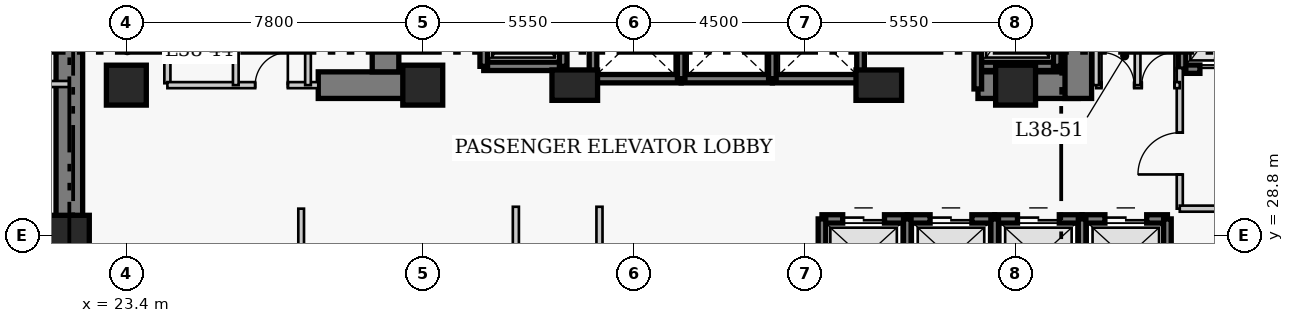
"""IFC4 building model, lengths in metres.
Left out: names, types, materials, properties, quantities, classifications, styles, units other than length and angle.
Written with IfcOpenShell. Run it as: python <this file> out.ifc"""

import sys

from ifc_helpers import new_model, si_unit, direction, frame, frame_2d, origin, origin_2d, place, context, subcontext, project, spatial, rectangle, extrude, element, fill, save


model = new_model("IFC4")
c1 = context("Model", 3, precision=1e-05, world=origin(), true_north=direction((0.0, 1.0)))
c2 = subcontext(c1, "Body", "Model", "MODEL_VIEW")
j1 = project(units=[si_unit("LENGTHUNIT", "METRE"), si_unit("PLANEANGLEUNIT", "RADIAN")], contexts=[c1])
p1 = place(None, origin())
s1 = spatial("IfcSite", under=j1, at=p1, CompositionType="ELEMENT")
p2 = place(p1, origin())
s2 = spatial("IfcBuilding", under=s1, at=p2, CompositionType="ELEMENT")
p3 = place(p2, frame((0.0, 0.0, 153.6)))
s3 = spatial("IfcBuildingStorey", under=s2, at=p3, CompositionType="ELEMENT", Elevation=153.6)
p4 = place(p3, frame((21.9, 27.05, 0.0), z_axis=(0.0, 0.0, 1.0), x_axis=(0.0, 1.0, 0.0)))
e1 = element("IfcWall", 1, at=p4, inside=s3, PredefinedType="SHEAR", context=c2, shape_type="SweptSolid", body=[
    extrude(rectangle(XDim=13.62, YDim=0.7, at=frame_2d((6.81, 0.0))), origin(), (0.0, 0.0, 1.0), 3.8),
])
p5 = place(p3, frame((28.45, 32.75, 0.0), z_axis=(0.0, 0.0, 1.0), x_axis=(1.0, 0.0, 0.0)))
e2 = element("IfcWall", 2, at=p5, inside=s3, PredefinedType="SHEAR", context=c2, shape_type="SweptSolid", body=[
    extrude(rectangle(XDim=2.4, YDim=0.7, at=frame_2d((1.2, 0.0))), origin(), (0.0, 0.0, 1.0), 3.8),
])
p6 = place(p3, frame((45.81, 32.75, 0.0), z_axis=(0.0, 0.0, 1.0), x_axis=(1.0, 0.0, 0.0)))
e3 = element("IfcWall", 3, at=p6, inside=s3, PredefinedType="SHEAR", context=c2, shape_type="SweptSolid", body=[
    extrude(rectangle(XDim=2.64, YDim=0.7, at=frame_2d((1.32, 0.0))), origin(), (0.0, 0.0, 1.0), 3.8),
])
p7 = place(p3, frame((30.22, 33.1, 0.0), z_axis=(0.0, 0.0, 1.0), x_axis=(0.0, 1.0, 0.0)))
e4 = element("IfcWall", 4, at=p7, inside=s3, PredefinedType="SHEAR", context=c2, shape_type="SweptSolid", body=[
    extrude(rectangle(XDim=7.22, YDim=0.7, at=frame_2d((3.61, 0.0))), origin(), (0.0, 0.0, 1.0), 3.8),
])
p8 = place(p3, frame((48.45, 32.4, 0.0), z_axis=(0.0, 0.0, 1.0), x_axis=(0.0, 1.0, 0.0)))
e5 = element("IfcWall", 5, at=p8, inside=s3, PredefinedType="SHEAR", context=c2, shape_type="SweptSolid", body=[
    extrude(rectangle(XDim=7.92, YDim=0.7, at=frame_2d((3.96, 0.0))), origin(), (0.0, 0.0, 1.0), 3.8),
])
p9 = place(p8, frame((5.8, 0.0, 0.0)))
e6 = element("IfcOpeningElement", 6, at=p9, cuts=e5, PredefinedType="OPENING", context=c2, shape_type="SweptSolid", body=[
    extrude(rectangle(XDim=1.1, YDim=2.15, at=frame_2d((0.55, 1.075))), frame((0.0, 0.36, 0.0), z_axis=(0.0, -1.0, 0.0), x_axis=(1.0, 0.0, 0.0)), (0.0, 0.0, 1.0), 0.72),
])
for number, where, z_axis, x_axis in (
    (7, (21.9, 28.8, 0.0), (0.0, 0.0, 1.0), (1.0, 0.0, 0.0)),
    (8, (23.4, 32.75, 0.0), (0.0, 0.0, 1.0), (1.0, 0.0, 0.0)),
    (9, (31.2, 32.75, 0.0), (0.0, 0.0, 1.0), (1.0, 0.0, 0.0)),
):
    element("IfcColumn", number, at=place(p3, frame(where, z_axis=z_axis, x_axis=x_axis)), inside=s3, PredefinedType="COLUMN", context=c2, shape_type="SweptSolid", body=[
        extrude(rectangle(XDim=1.05, YDim=1.05, at=origin_2d()), origin(), (0.0, 0.0, 1.0), 3.8),
    ])
for number, where, z_axis, x_axis in (
    (10, (35.2, 32.75, 0.0), (0.0, 0.0, 1.0), (1.0, 0.0, 0.0)),
    (11, (43.2, 32.75, 0.0), (0.0, 0.0, 1.0), (1.0, 0.0, 0.0)),
):
    element("IfcColumn", number, at=place(p3, frame(where, z_axis=z_axis, x_axis=x_axis)), inside=s3, PredefinedType="COLUMN", context=c2, shape_type="SweptSolid", body=[
        extrude(rectangle(XDim=1.2, YDim=0.8, at=origin_2d()), origin(), (0.0, 0.0, 1.0), 3.8),
    ])
p10 = place(p3, frame((46.8, 32.75, 0.0), z_axis=(0.0, 0.0, 1.0), x_axis=(1.0, 0.0, 0.0)))
e12 = element("IfcColumn", 12, at=p10, inside=s3, PredefinedType="COLUMN", context=c2, shape_type="SweptSolid", body=[
    extrude(rectangle(XDim=1.05, YDim=1.05, at=origin_2d()), origin(), (0.0, 0.0, 1.0), 3.8),
])
p11 = place(p3, frame((41.705, 29.23, 0.0), z_axis=(0.0, 0.0, 1.0), x_axis=(1.0, 0.0, 0.0)))
e13 = element("IfcWall", 13, at=p11, inside=s3, PredefinedType="SHEAR", context=c2, shape_type="SweptSolid", body=[
    extrude(rectangle(XDim=2.245, YDim=0.22, at=frame_2d((1.123, 0.0))), origin(), (0.0, 0.0, 1.0), 3.8),
])
p12 = place(p11, frame((0.545, 0.0, 0.0)))
e14 = element("IfcOpeningElement", 14, at=p12, cuts=e13, PredefinedType="OPENING", context=c2, shape_type="SweptSolid", body=[
    extrude(rectangle(XDim=1.1, YDim=2.15, at=frame_2d((0.55, 1.075))), frame((0.0, 0.12, 0.0), z_axis=(0.0, -1.0, 0.0), x_axis=(1.0, 0.0, 0.0)), (0.0, 0.0, 1.0), 0.24),
])
p13 = place(p3, frame((41.705, 27.17, 0.0), z_axis=(0.0, 0.0, 1.0), x_axis=(0.0, 1.0, 0.0)))
e15 = element("IfcWall", 15, at=p13, inside=s3, PredefinedType="SHEAR", context=c2, shape_type="SweptSolid", body=[
    extrude(rectangle(XDim=2.06, YDim=0.2, at=frame_2d((1.03, 0.0))), origin(), (0.0, 0.0, 1.0), 3.8),
])
p14 = place(p3, frame((43.95, 29.23, 0.0), z_axis=(0.0, 0.0, 1.0), x_axis=(1.0, 0.0, 0.0)))
e16 = element("IfcWall", 16, at=p14, inside=s3, PredefinedType="SHEAR", context=c2, shape_type="SweptSolid", body=[
    extrude(rectangle(XDim=2.3, YDim=0.22, at=frame_2d((1.15, 0.0))), origin(), (0.0, 0.0, 1.0), 3.8),
])
p15 = place(p14, frame((0.6, 0.0, 0.0)))
e17 = element("IfcOpeningElement", 17, at=p15, cuts=e16, PredefinedType="OPENING", context=c2, shape_type="SweptSolid", body=[
    extrude(rectangle(XDim=1.1, YDim=2.15, at=frame_2d((0.55, 1.075))), frame((0.0, 0.12, 0.0), z_axis=(0.0, -1.0, 0.0), x_axis=(1.0, 0.0, 0.0)), (0.0, 0.0, 1.0), 0.24),
])
p16 = place(p3, frame((43.95, 27.17, 0.0), z_axis=(0.0, 0.0, 1.0), x_axis=(0.0, 1.0, 0.0)))
e18 = element("IfcWall", 18, at=p16, inside=s3, PredefinedType="SHEAR", context=c2, shape_type="SweptSolid", body=[
    extrude(rectangle(XDim=2.06, YDim=0.2, at=frame_2d((1.03, 0.0))), origin(), (0.0, 0.0, 1.0), 3.8),
])
p17 = place(p3, frame((46.25, 29.23, 0.0), z_axis=(0.0, 0.0, 1.0), x_axis=(1.0, 0.0, 0.0)))
e19 = element("IfcWall", 19, at=p17, inside=s3, PredefinedType="SHEAR", context=c2, shape_type="SweptSolid", body=[
    extrude(rectangle(XDim=2.3, YDim=0.22, at=frame_2d((1.15, 0.0))), origin(), (0.0, 0.0, 1.0), 3.8),
])
p18 = place(p17, frame((0.6, 0.0, 0.0)))
e20 = element("IfcOpeningElement", 20, at=p18, cuts=e19, PredefinedType="OPENING", context=c2, shape_type="SweptSolid", body=[
    extrude(rectangle(XDim=1.1, YDim=2.15, at=frame_2d((0.55, 1.075))), frame((0.0, 0.12, 0.0), z_axis=(0.0, -1.0, 0.0), x_axis=(1.0, 0.0, 0.0)), (0.0, 0.0, 1.0), 0.24),
])
p19 = place(p3, frame((46.25, 27.17, 0.0), z_axis=(0.0, 0.0, 1.0), x_axis=(0.0, 1.0, 0.0)))
e21 = element("IfcWall", 21, at=p19, inside=s3, PredefinedType="SHEAR", context=c2, shape_type="SweptSolid", body=[
    extrude(rectangle(XDim=2.06, YDim=0.2, at=frame_2d((1.03, 0.0))), origin(), (0.0, 0.0, 1.0), 3.8),
])
p20 = place(p3, frame((48.55, 29.23, 0.0), z_axis=(0.0, 0.0, 1.0), x_axis=(1.0, 0.0, 0.0)))
e22 = element("IfcWall", 22, at=p20, inside=s3, PredefinedType="SHEAR", context=c2, shape_type="SweptSolid", body=[
    extrude(rectangle(XDim=2.245, YDim=0.22, at=frame_2d((1.123, 0.0))), origin(), (0.0, 0.0, 1.0), 3.8),
])
p21 = place(p20, frame((0.6, 0.0, 0.0)))
e23 = element("IfcOpeningElement", 23, at=p21, cuts=e22, PredefinedType="OPENING", context=c2, shape_type="SweptSolid", body=[
    extrude(rectangle(XDim=1.1, YDim=2.15, at=frame_2d((0.55, 1.075))), frame((0.0, 0.12, 0.0), z_axis=(0.0, -1.0, 0.0), x_axis=(1.0, 0.0, 0.0)), (0.0, 0.0, 1.0), 0.24),
])
for number, where, z_axis, x_axis in (
    (24, (48.55, 27.17, 0.0), (0.0, 0.0, 1.0), (0.0, 1.0, 0.0)),
    (25, (50.795, 27.17, 0.0), (0.0, 0.0, 1.0), (0.0, 1.0, 0.0)),
):
    element("IfcWall", number, at=place(p3, frame(where, z_axis=z_axis, x_axis=x_axis)), inside=s3, PredefinedType="SHEAR", context=c2, shape_type="SweptSolid", body=[
        extrude(rectangle(XDim=2.06, YDim=0.2, at=frame_2d((1.03, 0.0))), origin(), (0.0, 0.0, 1.0), 3.8),
    ])
p22 = place(p3, frame((35.68, 32.92, 0.0), z_axis=(0.0, 0.0, 1.0), x_axis=(1.0, 0.0, 0.0)))
e26 = element("IfcWall", 26, at=p22, inside=s3, PredefinedType="SHEAR", context=c2, shape_type="SweptSolid", body=[
    extrude(rectangle(XDim=2.32, YDim=0.22, at=frame_2d((1.16, 0.0))), origin(), (0.0, 0.0, 1.0), 3.8),
])
p23 = place(p3, frame((35.68, 32.92, 0.0), z_axis=(0.0, 0.0, 1.0), x_axis=(0.0, 1.0, 0.0)))
e27 = element("IfcWall", 27, at=p23, inside=s3, PredefinedType="SHEAR", context=c2, shape_type="SweptSolid", body=[
    extrude(rectangle(XDim=2.16, YDim=0.2, at=frame_2d((1.08, 0.0))), origin(), (0.0, 0.0, 1.0), 3.8),
])
p24 = place(p3, frame((38.0, 32.92, 0.0), z_axis=(0.0, 0.0, 1.0), x_axis=(1.0, 0.0, 0.0)))
e28 = element("IfcWall", 28, at=p24, inside=s3, PredefinedType="SHEAR", context=c2, shape_type="SweptSolid", body=[
    extrude(rectangle(XDim=2.4, YDim=0.22, at=frame_2d((1.2, 0.0))), origin(), (0.0, 0.0, 1.0), 3.8),
])
p25 = place(p3, frame((38.0, 32.92, 0.0), z_axis=(0.0, 0.0, 1.0), x_axis=(0.0, 1.0, 0.0)))
e29 = element("IfcWall", 29, at=p25, inside=s3, PredefinedType="SHEAR", context=c2, shape_type="SweptSolid", body=[
    extrude(rectangle(XDim=2.16, YDim=0.2, at=frame_2d((1.08, 0.0))), origin(), (0.0, 0.0, 1.0), 3.8),
])
p26 = place(p3, frame((40.4, 32.92, 0.0), z_axis=(0.0, 0.0, 1.0), x_axis=(1.0, 0.0, 0.0)))
e30 = element("IfcWall", 30, at=p26, inside=s3, PredefinedType="SHEAR", context=c2, shape_type="SweptSolid", body=[
    extrude(rectangle(XDim=2.32, YDim=0.22, at=frame_2d((1.16, 0.0))), origin(), (0.0, 0.0, 1.0), 3.8),
])
for number, where, z_axis, x_axis in (
    (31, (40.4, 32.92, 0.0), (0.0, 0.0, 1.0), (0.0, 1.0, 0.0)),
    (32, (42.72, 32.92, 0.0), (0.0, 0.0, 1.0), (0.0, 1.0, 0.0)),
):
    element("IfcWall", number, at=place(p3, frame(where, z_axis=z_axis, x_axis=x_axis)), inside=s3, PredefinedType="SHEAR", context=c2, shape_type="SweptSolid", body=[
        extrude(rectangle(XDim=2.16, YDim=0.2, at=frame_2d((1.08, 0.0))), origin(), (0.0, 0.0, 1.0), 3.8),
    ])
p27 = place(p3, frame((51.18, 33.17, 0.0), z_axis=(0.0, 0.0, 1.0), x_axis=(1.0, 0.0, 0.0)))
e33 = element("IfcWall", 33, at=p27, inside=s3, PredefinedType="SHEAR", context=c2, shape_type="SweptSolid", body=[
    extrude(rectangle(XDim=2.42, YDim=0.22, at=frame_2d((1.21, 0.0))), origin(), (0.0, 0.0, 1.0), 3.8),
])
p28 = place(p27, frame((0.47, 0.0, 0.0)))
e34 = element("IfcOpeningElement", 34, at=p28, cuts=e33, PredefinedType="OPENING", context=c2, shape_type="SweptSolid", body=[
    extrude(rectangle(XDim=1.3, YDim=2.15, at=frame_2d((0.65, 1.075))), frame((0.0, 0.12, 0.0), z_axis=(0.0, -1.0, 0.0), x_axis=(1.0, 0.0, 0.0)), (0.0, 0.0, 1.0), 0.24),
])
p29 = place(p3, frame((51.18, 33.17, 0.0), z_axis=(0.0, 0.0, 1.0), x_axis=(0.0, 1.0, 0.0)))
e35 = element("IfcWall", 35, at=p29, inside=s3, PredefinedType="SHEAR", context=c2, shape_type="SweptSolid", body=[
    extrude(rectangle(XDim=2.86, YDim=0.2, at=frame_2d((1.43, 0.0))), origin(), (0.0, 0.0, 1.0), 3.8),
])
p30 = place(p3, frame((32.805, 33.245, 0.0), z_axis=(0.0, 0.0, 1.0), x_axis=(1.0, 0.0, 0.0)))
e36 = element("IfcWall", 36, at=p30, inside=s3, PredefinedType="SHEAR", context=c2, shape_type="SweptSolid", body=[
    extrude(rectangle(XDim=2.09, YDim=0.22, at=frame_2d((1.045, 0.0))), origin(), (0.0, 0.0, 1.0), 3.8),
])
for number, where, z_axis, x_axis in (
    (37, (32.805, 33.245, 0.0), (0.0, 0.0, 1.0), (0.0, 1.0, 0.0)),
    (38, (34.895, 33.245, 0.0), (0.0, 0.0, 1.0), (0.0, 1.0, 0.0)),
):
    element("IfcWall", number, at=place(p3, frame(where, z_axis=z_axis, x_axis=x_axis)), inside=s3, PredefinedType="SHEAR", context=c2, shape_type="SweptSolid", body=[
        extrude(rectangle(XDim=2.91, YDim=0.2, at=frame_2d((1.455, 0.0))), origin(), (0.0, 0.0, 1.0), 3.8),
    ])
p31 = place(p3, frame((45.805, 33.245, 0.0), z_axis=(0.0, 0.0, 1.0), x_axis=(1.0, 0.0, 0.0)))
e39 = element("IfcWall", 39, at=p31, inside=s3, PredefinedType="SHEAR", context=c2, shape_type="SweptSolid", body=[
    extrude(rectangle(XDim=2.09, YDim=0.22, at=frame_2d((1.045, 0.0))), origin(), (0.0, 0.0, 1.0), 3.8),
])
p32 = place(p3, frame((45.805, 32.65, 0.0), z_axis=(0.0, 0.0, 1.0), x_axis=(0.0, 1.0, 0.0)))
e40 = element("IfcWall", 40, at=p32, inside=s3, PredefinedType="SHEAR", context=c2, shape_type="SweptSolid", body=[
    extrude(rectangle(XDim=3.505, YDim=0.2, at=frame_2d((1.752, 0.0))), origin(), (0.0, 0.0, 1.0), 3.8),
])
p33 = place(p3, frame((47.895, 33.245, 0.0), z_axis=(0.0, 0.0, 1.0), x_axis=(0.0, 1.0, 0.0)))
e41 = element("IfcWall", 41, at=p33, inside=s3, PredefinedType="SHEAR", context=c2, shape_type="SweptSolid", body=[
    extrude(rectangle(XDim=2.91, YDim=0.2, at=frame_2d((1.455, 0.0))), origin(), (0.0, 0.0, 1.0), 3.8),
])
p34 = place(p3, frame((24.48, 32.8, 0.0), z_axis=(0.0, 0.0, 1.0), x_axis=(0.0, 1.0, 0.0)))
e42 = element("IfcWall", 42, at=p34, inside=s3, PredefinedType="PARTITIONING", context=c2, shape_type="SweptSolid", body=[
    extrude(rectangle(XDim=3.57, YDim=0.16, at=frame_2d((1.785, 0.0))), origin(), (0.0, 0.0, 1.0), 3.55),
])
p35 = place(p34, frame((1.604, 0.0, 0.0)))
e43 = element("IfcOpeningElement", 43, at=p35, cuts=e42, PredefinedType="OPENING", context=c2, shape_type="SweptSolid", body=[
    extrude(rectangle(XDim=0.9, YDim=2.1, at=frame_2d((0.45, 1.05))), frame((0.0, 0.09, 0.0), z_axis=(0.0, -1.0, 0.0), x_axis=(1.0, 0.0, 0.0)), (0.0, 0.0, 1.0), 0.18),
])
p36 = place(p3, frame((51.12, 29.5, 0.0), z_axis=(0.0, 0.0, 1.0), x_axis=(0.0, 1.0, 0.0)))
e44 = element("IfcWall", 44, at=p36, inside=s3, PredefinedType="PARTITIONING", context=c2, shape_type="SweptSolid", body=[
    extrude(rectangle(XDim=3.7, YDim=0.16, at=frame_2d((1.85, 0.0))), origin(), (0.0, 0.0, 1.0), 3.55),
])
p37 = place(p36, frame((0.9, 0.0, 0.0)))
e45 = element("IfcOpeningElement", 45, at=p37, cuts=e44, PredefinedType="OPENING", context=c2, shape_type="SweptSolid", body=[
    extrude(rectangle(XDim=1.1, YDim=2.15, at=frame_2d((0.55, 1.075))), frame((0.0, 0.09, 0.0), z_axis=(0.0, -1.0, 0.0), x_axis=(1.0, 0.0, 0.0)), (0.0, 0.0, 1.0), 0.18),
])
p38 = place(p3, frame((51.12, 29.5, 0.0), z_axis=(0.0, 0.0, 1.0), x_axis=(1.0, 0.0, 0.0)))
e46 = element("IfcWall", 46, at=p38, inside=s3, PredefinedType="PARTITIONING", context=c2, shape_type="SweptSolid", body=[
    extrude(rectangle(XDim=5.63, YDim=0.16, at=frame_2d((2.815, 0.0))), origin(), (0.0, 0.0, 1.0), 3.55),
])
p39 = place(p3, frame((24.48, 32.75, 0.0), z_axis=(0.0, 0.0, 1.0), x_axis=(1.0, 0.0, 0.0)))
e47 = element("IfcWall", 47, at=p39, inside=s3, PredefinedType="PARTITIONING", context=c2, shape_type="SweptSolid", body=[
    extrude(rectangle(XDim=3.97, YDim=0.16, at=frame_2d((1.985, 0.0))), origin(), (0.0, 0.0, 1.0), 3.55),
])
p40 = place(p39, frame((2.31, 0.0, 0.0)))
e48 = element("IfcOpeningElement", 48, at=p40, cuts=e47, PredefinedType="OPENING", context=c2, shape_type="SweptSolid", body=[
    extrude(rectangle(XDim=0.86, YDim=2.05, at=frame_2d((0.43, 1.025))), frame((0.0, 0.09, 0.0), z_axis=(0.0, -1.0, 0.0), x_axis=(1.0, 0.0, 0.0)), (0.0, 0.0, 1.0), 0.18),
])
p41 = place(p3, frame((48.92, 32.75, 0.0), z_axis=(0.0, 0.0, 1.0), x_axis=(1.0, 0.0, 0.0)))
e49 = element("IfcWall", 49, at=p41, inside=s3, PredefinedType="PARTITIONING", context=c2, shape_type="SweptSolid", body=[
    extrude(rectangle(XDim=2.2, YDim=0.16, at=frame_2d((1.1, 0.0))), origin(), (0.0, 0.0, 1.0), 3.55),
])
p42 = place(p41, frame((0.14, 0.0, 0.0)))
e50 = element("IfcOpeningElement", 50, at=p42, cuts=e49, PredefinedType="OPENING", context=c2, shape_type="SweptSolid", body=[
    extrude(rectangle(XDim=0.86, YDim=2.05, at=frame_2d((0.43, 1.025))), frame((0.0, 0.09, 0.0), z_axis=(0.0, -1.0, 0.0), x_axis=(1.0, 0.0, 0.0)), (0.0, 0.0, 1.0), 0.18),
])
p43 = place(p41, frame((1.2, 0.0, 0.0)))
e51 = element("IfcOpeningElement", 51, at=p43, cuts=e49, PredefinedType="OPENING", context=c2, shape_type="SweptSolid", body=[
    extrude(rectangle(XDim=0.86, YDim=2.05, at=frame_2d((0.43, 1.025))), frame((0.0, 0.09, 0.0), z_axis=(0.0, -1.0, 0.0), x_axis=(1.0, 0.0, 0.0)), (0.0, 0.0, 1.0), 0.18),
])
for number, where, z_axis, x_axis in (
    (52, (48.92, 32.75, 0.0), (0.0, 0.0, 1.0), (0.0, 1.0, 0.0)),
    (53, (26.28, 32.75, 0.0), (0.0, 0.0, 1.0), (0.0, 1.0, 0.0)),
    (54, (28.18, 32.75, 0.0), (0.0, 0.0, 1.0), (0.0, 1.0, 0.0)),
    (55, (50.01, 32.75, 0.0), (0.0, 0.0, 1.0), (0.0, 1.0, 0.0)),
):
    element("IfcWall", number, at=place(p3, frame(where, z_axis=z_axis, x_axis=x_axis)), inside=s3, PredefinedType="PARTITIONING", context=c2, shape_type="SweptSolid", body=[
        extrude(rectangle(XDim=3.62, YDim=0.15, at=frame_2d((1.81, 0.0))), origin(), (0.0, 0.0, 1.0), 3.55),
    ])
for number, where, z_axis, x_axis in (
    (56, (33.65, 16.51, 0.0), (0.0, 0.0, 1.0), (0.0, 1.0, 0.0)),
    (57, (35.85, 16.51, 0.0), (0.0, 0.0, 1.0), (0.0, 1.0, 0.0)),
):
    element("IfcWall", number, at=place(p3, frame(where, z_axis=z_axis, x_axis=x_axis)), inside=s3, PredefinedType="PARTITIONING", context=c2, shape_type="SweptSolid", body=[
        extrude(rectangle(XDim=13.04, YDim=0.16, at=frame_2d((6.52, 0.0))), origin(), (0.0, 0.0, 1.0), 3.55),
    ])
p44 = place(p3, frame((19.41, 32.78, 0.0), z_axis=(0.0, 0.0, 1.0), x_axis=(1.0, 0.0, 0.0)))
e58 = element("IfcWall", 58, at=p44, inside=s3, PredefinedType="PARTITIONING", context=c2, shape_type="SweptSolid", body=[
    extrude(rectangle(XDim=2.49, YDim=0.16, at=frame_2d((1.245, 0.0))), origin(), (0.0, 0.0, 1.0), 3.55),
])
p45 = place(p3, frame((28.0, 16.51, 0.0), z_axis=(0.0, 0.0, 1.0), x_axis=(0.0, 1.0, 0.0)))
e59 = element("IfcWall", 59, at=p45, inside=s3, PredefinedType="PARTITIONING", context=c2, shape_type="SweptSolid", body=[
    extrude(rectangle(XDim=12.99, YDim=0.15, at=frame_2d((6.495, 0.0))), origin(), (0.0, 0.0, 1.0), 3.55),
])
p46 = place(p12, origin())
e60 = element("IfcDoor", 60, at=p46, inside=s3, OperationType="DOUBLE_DOOR_SLIDING", PredefinedType="DOOR", context=c2, shape_type="SweptSolid", body=[
    extrude(rectangle(XDim=1.1, YDim=2.15, at=frame_2d((0.55, 1.075))), frame((0.0, 0.025, 0.0), z_axis=(0.0, -1.0, 0.0), x_axis=(1.0, 0.0, 0.0)), (0.0, 0.0, 1.0), 0.05),
])
fill(e14, e60)
p47 = place(p15, origin())
e61 = element("IfcDoor", 61, at=p47, inside=s3, OperationType="DOUBLE_DOOR_SLIDING", PredefinedType="DOOR", context=c2, shape_type="SweptSolid", body=[
    extrude(rectangle(XDim=1.1, YDim=2.15, at=frame_2d((0.55, 1.075))), frame((0.0, 0.025, 0.0), z_axis=(0.0, -1.0, 0.0), x_axis=(1.0, 0.0, 0.0)), (0.0, 0.0, 1.0), 0.05),
])
fill(e17, e61)
p48 = place(p18, origin())
e62 = element("IfcDoor", 62, at=p48, inside=s3, OperationType="DOUBLE_DOOR_SLIDING", PredefinedType="DOOR", context=c2, shape_type="SweptSolid", body=[
    extrude(rectangle(XDim=1.1, YDim=2.15, at=frame_2d((0.55, 1.075))), frame((0.0, 0.025, 0.0), z_axis=(0.0, -1.0, 0.0), x_axis=(1.0, 0.0, 0.0)), (0.0, 0.0, 1.0), 0.05),
])
fill(e20, e62)
p49 = place(p21, origin())
e63 = element("IfcDoor", 63, at=p49, inside=s3, OperationType="DOUBLE_DOOR_SLIDING", PredefinedType="DOOR", context=c2, shape_type="SweptSolid", body=[
    extrude(rectangle(XDim=1.1, YDim=2.15, at=frame_2d((0.55, 1.075))), frame((0.0, 0.025, 0.0), z_axis=(0.0, -1.0, 0.0), x_axis=(1.0, 0.0, 0.0)), (0.0, 0.0, 1.0), 0.05),
])
fill(e23, e63)
p50 = place(p28, origin())
e64 = element("IfcDoor", 64, at=p50, inside=s3, OperationType="DOUBLE_DOOR_SLIDING", PredefinedType="DOOR", context=c2, shape_type="SweptSolid", body=[
    extrude(rectangle(XDim=1.3, YDim=2.15, at=frame_2d((0.65, 1.075))), frame((0.0, 0.025, 0.0), z_axis=(0.0, -1.0, 0.0), x_axis=(1.0, 0.0, 0.0)), (0.0, 0.0, 1.0), 0.05),
])
fill(e34, e64)
p51 = place(p37, origin())
e65 = element("IfcDoor", 65, at=p51, inside=s3, OperationType="SINGLE_SWING_LEFT", PredefinedType="DOOR", context=c2, shape_type="SweptSolid", body=[
    extrude(rectangle(XDim=1.1, YDim=2.15, at=frame_2d((0.55, 1.075))), frame((0.0, 0.025, 0.0), z_axis=(0.0, -1.0, 0.0), x_axis=(1.0, 0.0, 0.0)), (0.0, 0.0, 1.0), 0.05),
])
fill(e45, e65)
p52 = place(p40, origin())
e66 = element("IfcDoor", 66, at=p52, inside=s3, OperationType="SINGLE_SWING_RIGHT", PredefinedType="DOOR", context=c2, shape_type="SweptSolid", body=[
    extrude(rectangle(XDim=0.86, YDim=2.05, at=frame_2d((0.43, 1.025))), frame((0.0, 0.025, 0.0), z_axis=(0.0, -1.0, 0.0), x_axis=(1.0, 0.0, 0.0)), (0.0, 0.0, 1.0), 0.05),
])
fill(e48, e66)
p53 = place(p42, origin())
e67 = element("IfcDoor", 67, at=p53, inside=s3, OperationType="SINGLE_SWING_LEFT", PredefinedType="DOOR", context=c2, shape_type="SweptSolid", body=[
    extrude(rectangle(XDim=0.86, YDim=2.05, at=frame_2d((0.43, 1.025))), frame((0.0, 0.025, 0.0), z_axis=(0.0, -1.0, 0.0), x_axis=(1.0, 0.0, 0.0)), (0.0, 0.0, 1.0), 0.05),
])
fill(e50, e67)
p54 = place(p43, origin())
e68 = element("IfcDoor", 68, at=p54, inside=s3, OperationType="SINGLE_SWING_RIGHT", PredefinedType="DOOR", context=c2, shape_type="SweptSolid", body=[
    extrude(rectangle(XDim=0.86, YDim=2.05, at=frame_2d((0.43, 1.025))), frame((0.0, 0.025, 0.0), z_axis=(0.0, -1.0, 0.0), x_axis=(1.0, 0.0, 0.0)), (0.0, 0.0, 1.0), 0.05),
])
fill(e51, e68)
save(model, sys.argv[1])
